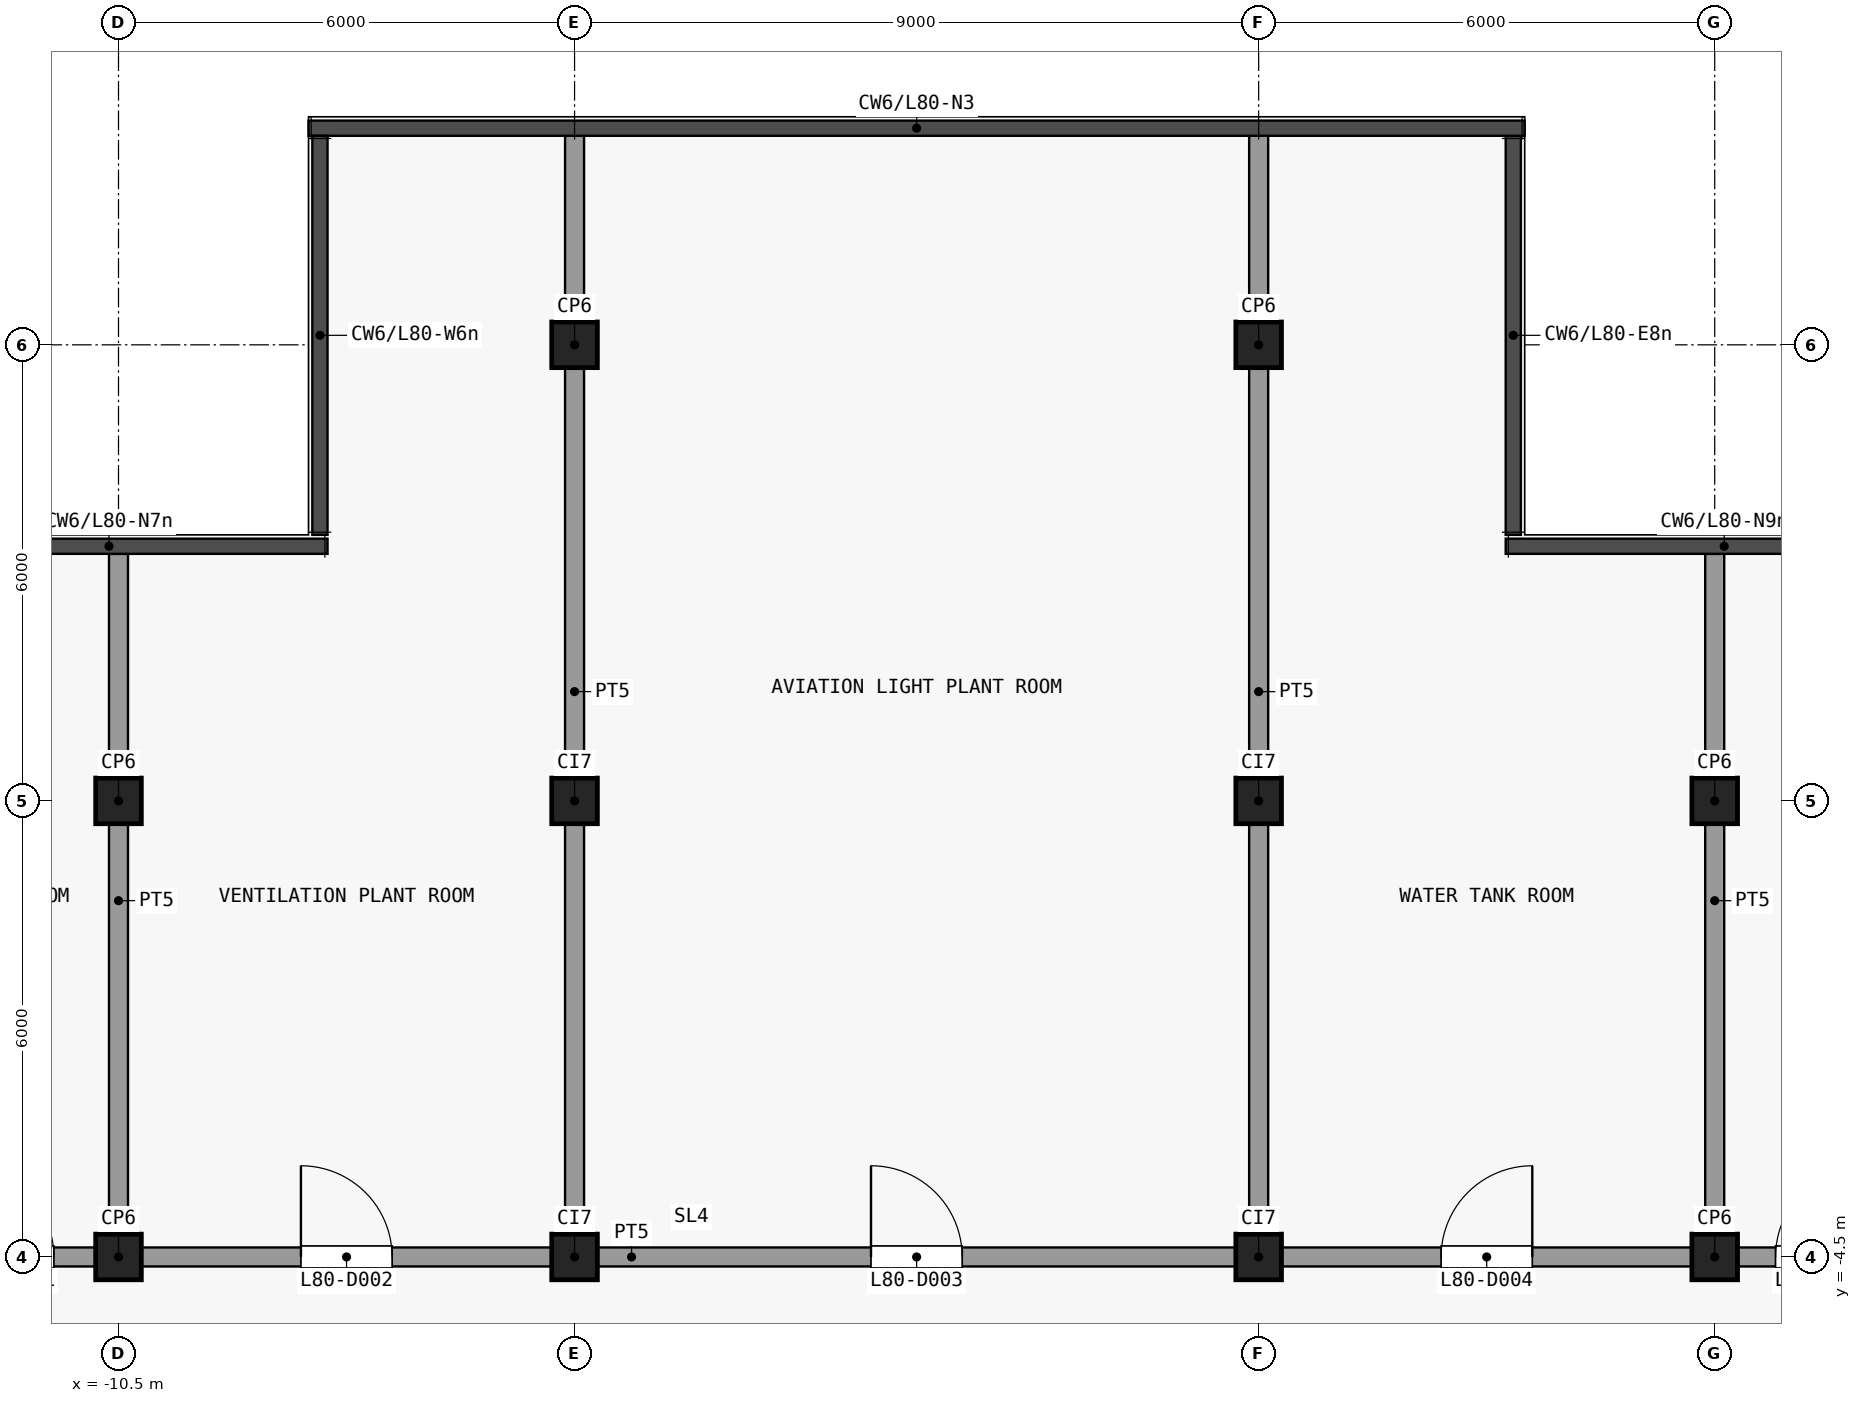
"""IFC4 building model, lengths in metres.
Left out: names, types, materials, properties, quantities, classifications, styles, units other than length and angle.
Written with IfcOpenShell. Run it as: python <this file> out.ifc"""

import sys

from ifc_helpers import new_model, si_unit, direction, frame, frame_2d, origin, origin_2d, place, context, subcontext, project, spatial, rectangle, extrude, element, fill, save


model = new_model("IFC4")
c1 = context("Model", 3, precision=1e-05, world=origin(), true_north=direction((0.0, 1.0)))
c2 = subcontext(c1, "Body", "Model", "MODEL_VIEW")
j1 = project(units=[si_unit("LENGTHUNIT", "METRE"), si_unit("PLANEANGLEUNIT", "RADIAN")], contexts=[c1])
p1 = place(None, origin())
s1 = spatial("IfcSite", under=j1, at=p1, CompositionType="ELEMENT")
p2 = place(p1, origin())
s2 = spatial("IfcBuilding", under=s1, at=p2, CompositionType="ELEMENT")
p3 = place(p2, frame((0.0, 0.0, 316.7)))
s3 = spatial("IfcBuildingStorey", under=s2, at=p3, CompositionType="ELEMENT", Elevation=316.7)
for number, where, z_axis, x_axis in (
    (1, (-10.5, -4.5, 0.0), (0.0, 0.0, 1.0), (1.0, 0.0, 0.0)),
    (2, (-10.5, 1.5, 0.0), (0.0, 0.0, 1.0), (1.0, 0.0, 0.0)),
    (3, (-4.5, -4.5, 0.0), (0.0, 0.0, 1.0), (1.0, 0.0, 0.0)),
    (4, (-4.5, 1.5, 0.0), (0.0, 0.0, 1.0), (1.0, 0.0, 0.0)),
    (5, (-4.5, 7.5, 0.0), (0.0, 0.0, 1.0), (1.0, 0.0, 0.0)),
    (6, (4.5, -4.5, 0.0), (0.0, 0.0, 1.0), (1.0, 0.0, 0.0)),
    (7, (4.5, 1.5, 0.0), (0.0, 0.0, 1.0), (1.0, 0.0, 0.0)),
    (8, (4.5, 7.5, 0.0), (0.0, 0.0, 1.0), (1.0, 0.0, 0.0)),
    (9, (10.5, -4.5, 0.0), (0.0, 0.0, 1.0), (1.0, 0.0, 0.0)),
    (10, (10.5, 1.5, 0.0), (0.0, 0.0, 1.0), (1.0, 0.0, 0.0)),
):
    element("IfcColumn", number, at=place(p3, frame(where, z_axis=z_axis, x_axis=x_axis)), inside=s3, PredefinedType="COLUMN", context=c2, shape_type="SweptSolid", body=[
        extrude(rectangle(XDim=0.6, YDim=0.6, at=origin_2d()), origin(), (0.0, 0.0, 1.0), 4.5),
    ])
p4 = place(p3, frame((-13.35, -4.5, 0.0), z_axis=(0.0, 0.0, 1.0), x_axis=(1.0, 0.0, 0.0)))
e11 = element("IfcWall", 11, at=p4, inside=s3, PredefinedType="PARTITIONING", context=c2, shape_type="SweptSolid", body=[
    extrude(rectangle(XDim=26.7, YDim=0.25, at=frame_2d((13.35, 0.0))), origin(), (0.0, 0.0, 1.0), 4.2),
])
p5 = place(p4, frame((0.8, 0.0, 0.0)))
e12 = element("IfcOpeningElement", 12, at=p5, cuts=e11, PredefinedType="OPENING", context=c2, shape_type="SweptSolid", body=[
    extrude(rectangle(XDim=1.2, YDim=2.1, at=frame_2d((0.6, 1.05))), frame((0.0, 0.135, 0.0), z_axis=(0.0, -1.0, 0.0), x_axis=(1.0, 0.0, 0.0)), (0.0, 0.0, 1.0), 0.27),
])
p6 = place(p4, frame((5.25, 0.0, 0.0)))
e13 = element("IfcOpeningElement", 13, at=p6, cuts=e11, PredefinedType="OPENING", context=c2, shape_type="SweptSolid", body=[
    extrude(rectangle(XDim=1.2, YDim=2.1, at=frame_2d((0.6, 1.05))), frame((0.0, 0.135, 0.0), z_axis=(0.0, -1.0, 0.0), x_axis=(1.0, 0.0, 0.0)), (0.0, 0.0, 1.0), 0.27),
])
p7 = place(p4, frame((12.75, 0.0, 0.0)))
e14 = element("IfcOpeningElement", 14, at=p7, cuts=e11, PredefinedType="OPENING", context=c2, shape_type="SweptSolid", body=[
    extrude(rectangle(XDim=1.2, YDim=2.1, at=frame_2d((0.6, 1.05))), frame((0.0, 0.135, 0.0), z_axis=(0.0, -1.0, 0.0), x_axis=(1.0, 0.0, 0.0)), (0.0, 0.0, 1.0), 0.27),
])
p8 = place(p4, frame((20.25, 0.0, 0.0)))
e15 = element("IfcOpeningElement", 15, at=p8, cuts=e11, PredefinedType="OPENING", context=c2, shape_type="SweptSolid", body=[
    extrude(rectangle(XDim=1.2, YDim=2.1, at=frame_2d((0.6, 1.05))), frame((0.0, 0.135, 0.0), z_axis=(0.0, -1.0, 0.0), x_axis=(1.0, 0.0, 0.0)), (0.0, 0.0, 1.0), 0.27),
])
p9 = place(p4, frame((24.65, 0.0, 0.0)))
e16 = element("IfcOpeningElement", 16, at=p9, cuts=e11, PredefinedType="OPENING", context=c2, shape_type="SweptSolid", body=[
    extrude(rectangle(XDim=1.2, YDim=2.1, at=frame_2d((0.6, 1.05))), frame((0.0, 0.135, 0.0), z_axis=(0.0, -1.0, 0.0), x_axis=(1.0, 0.0, 0.0)), (0.0, 0.0, 1.0), 0.27),
])
p10 = place(p3, frame((-10.5, -4.375, 0.0), z_axis=(0.0, 0.0, 1.0), x_axis=(0.0, 1.0, 0.0)))
e17 = element("IfcWall", 17, at=p10, inside=s3, PredefinedType="PARTITIONING", context=c2, shape_type="SweptSolid", body=[
    extrude(rectangle(XDim=9.125, YDim=0.25, at=frame_2d((4.562, 0.0))), origin(), (0.0, 0.0, 1.0), 4.2),
])
for number, where, z_axis, x_axis in (
    (18, (-4.5, -4.375, 0.0), (0.0, 0.0, 1.0), (0.0, 1.0, 0.0)),
    (19, (4.5, -4.375, 0.0), (0.0, 0.0, 1.0), (0.0, 1.0, 0.0)),
):
    element("IfcWall", number, at=place(p3, frame(where, z_axis=z_axis, x_axis=x_axis)), inside=s3, PredefinedType="PARTITIONING", context=c2, shape_type="SweptSolid", body=[
        extrude(rectangle(XDim=14.625, YDim=0.25, at=frame_2d((7.312, 0.0))), origin(), (0.0, 0.0, 1.0), 4.2),
    ])
p11 = place(p3, frame((10.5, -4.375, 0.0), z_axis=(0.0, 0.0, 1.0), x_axis=(0.0, 1.0, 0.0)))
e20 = element("IfcWall", 20, at=p11, inside=s3, PredefinedType="PARTITIONING", context=c2, shape_type="SweptSolid", body=[
    extrude(rectangle(XDim=9.125, YDim=0.25, at=frame_2d((4.562, 0.0))), origin(), (0.0, 0.0, 1.0), 4.2),
])
p12 = place(p5, origin())
e21 = element("IfcDoor", 21, at=p12, inside=s3, OperationType="SINGLE_SWING_RIGHT", PredefinedType="DOOR", context=c2, shape_type="SweptSolid", body=[
    extrude(rectangle(XDim=1.2, YDim=2.1, at=frame_2d((0.6, 1.05))), frame((0.0, 0.025, 0.0), z_axis=(0.0, -1.0, 0.0), x_axis=(1.0, 0.0, 0.0)), (0.0, 0.0, 1.0), 0.05),
])
fill(e12, e21)
p13 = place(p6, origin())
e22 = element("IfcDoor", 22, at=p13, inside=s3, OperationType="SINGLE_SWING_RIGHT", PredefinedType="DOOR", context=c2, shape_type="SweptSolid", body=[
    extrude(rectangle(XDim=1.2, YDim=2.1, at=frame_2d((0.6, 1.05))), frame((0.0, 0.025, 0.0), z_axis=(0.0, -1.0, 0.0), x_axis=(1.0, 0.0, 0.0)), (0.0, 0.0, 1.0), 0.05),
])
fill(e13, e22)
p14 = place(p7, origin())
e23 = element("IfcDoor", 23, at=p14, inside=s3, OperationType="SINGLE_SWING_RIGHT", PredefinedType="DOOR", context=c2, shape_type="SweptSolid", body=[
    extrude(rectangle(XDim=1.2, YDim=2.1, at=frame_2d((0.6, 1.05))), frame((0.0, 0.025, 0.0), z_axis=(0.0, -1.0, 0.0), x_axis=(1.0, 0.0, 0.0)), (0.0, 0.0, 1.0), 0.05),
])
fill(e14, e23)
p15 = place(p8, origin())
e24 = element("IfcDoor", 24, at=p15, inside=s3, OperationType="SINGLE_SWING_LEFT", PredefinedType="DOOR", context=c2, shape_type="SweptSolid", body=[
    extrude(rectangle(XDim=1.2, YDim=2.1, at=frame_2d((0.6, 1.05))), frame((0.0, 0.025, 0.0), z_axis=(0.0, -1.0, 0.0), x_axis=(1.0, 0.0, 0.0)), (0.0, 0.0, 1.0), 0.05),
])
fill(e15, e24)
p16 = place(p9, origin())
e25 = element("IfcDoor", 25, at=p16, inside=s3, OperationType="SINGLE_SWING_LEFT", PredefinedType="DOOR", context=c2, shape_type="SweptSolid", body=[
    extrude(rectangle(XDim=1.2, YDim=2.1, at=frame_2d((0.6, 1.05))), frame((0.0, 0.025, 0.0), z_axis=(0.0, -1.0, 0.0), x_axis=(1.0, 0.0, 0.0)), (0.0, 0.0, 1.0), 0.05),
])
fill(e16, e25)
save(model, sys.argv[1])
